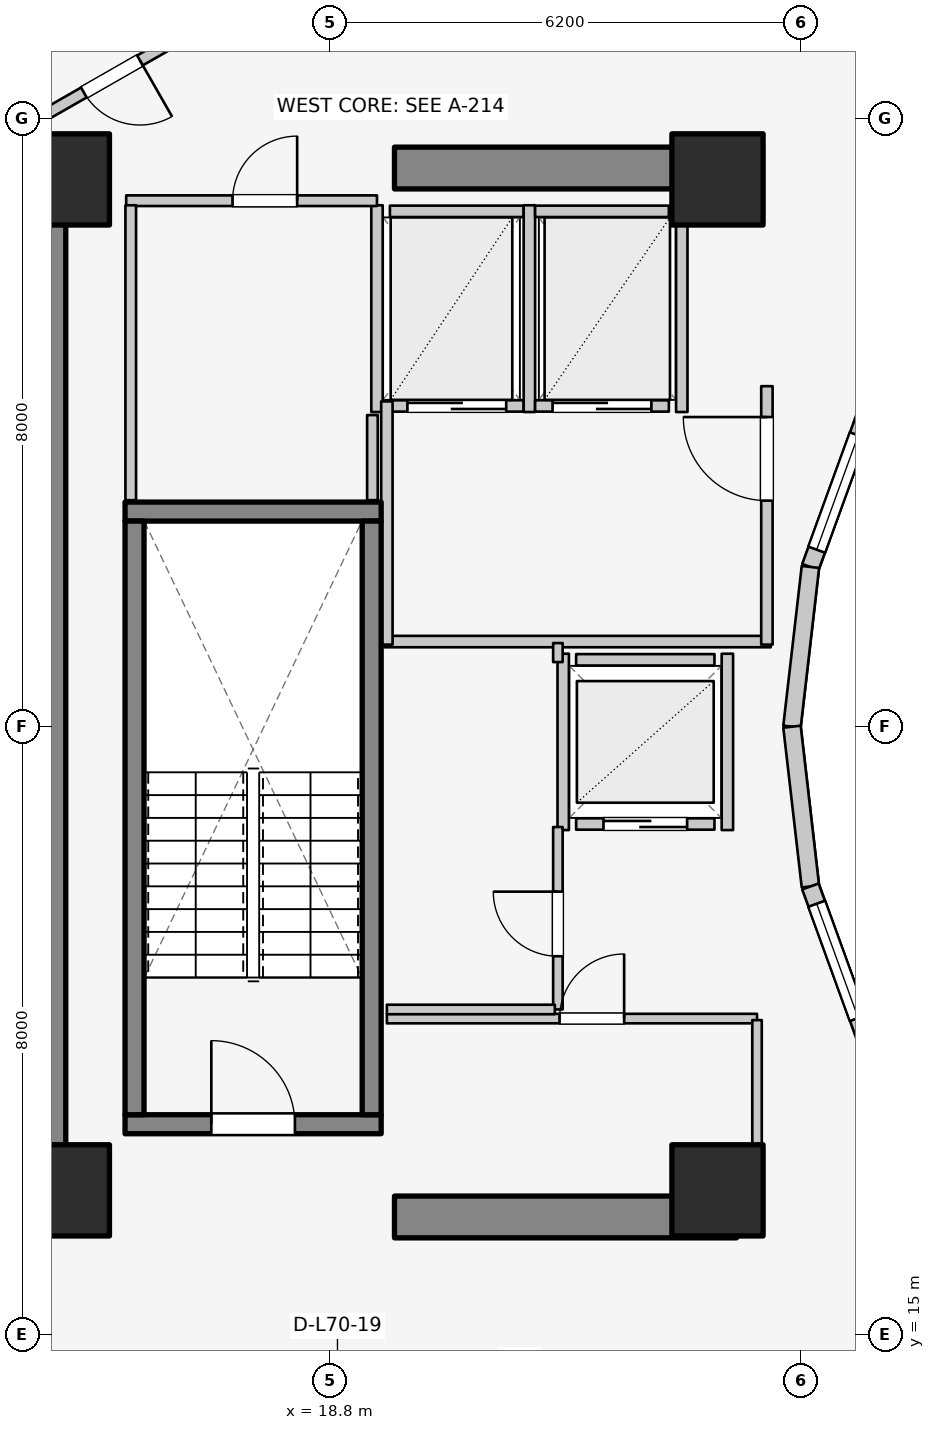
"""IFC4 building model, lengths in metres.
Left out: names, types, materials, properties, quantities, classifications, styles, units other than length and angle.
Written with IfcOpenShell. Run it as: python <this file> out.ifc"""

import sys

from ifc_helpers import new_model, si_unit, direction, frame, frame_2d, origin, origin_2d, place, context, subcontext, project, spatial, rectangle, extrude, element, fill, save


model = new_model("IFC4")
c1 = context("Model", 3, precision=1e-05, world=origin(), true_north=direction((0.0, 1.0)))
c2 = subcontext(c1, "Body", "Model", "MODEL_VIEW")
j1 = project(units=[si_unit("LENGTHUNIT", "METRE"), si_unit("PLANEANGLEUNIT", "RADIAN")], contexts=[c1])
p1 = place(None, origin())
s1 = spatial("IfcSite", under=j1, at=p1, CompositionType="ELEMENT")
p2 = place(p1, origin())
s2 = spatial("IfcBuilding", under=s1, at=p2, CompositionType="ELEMENT")
p3 = place(p2, frame((0.0, 0.0, 229.5)))
s3 = spatial("IfcBuildingStorey", under=s2, at=p3, CompositionType="ELEMENT", Elevation=229.5)
p4 = place(p3, frame((15.05, 17.05, 0.0), z_axis=(0.0, 0.0, 1.0), x_axis=(0.0, 1.0, 0.0)))
e1 = element("IfcWall", 1, at=p4, inside=s3, PredefinedType="SHEAR", context=c2, shape_type="SweptSolid", body=[
    extrude(rectangle(XDim=12.8, YDim=0.55, at=frame_2d((6.4, 0.0))), origin(), (0.0, 0.0, 1.0), 3.1),
])
for number, where, z_axis, x_axis in (
    (2, (19.65, 16.55, 0.0), (0.0, 0.0, 1.0), (1.0, 0.0, 0.0)),
    (3, (19.65, 30.35, 0.0), (0.0, 0.0, 1.0), (1.0, 0.0, 0.0)),
):
    element("IfcWall", number, at=place(p3, frame(where, z_axis=z_axis, x_axis=x_axis)), inside=s3, PredefinedType="SHEAR", context=c2, shape_type="SweptSolid", body=[
        extrude(rectangle(XDim=4.5, YDim=0.55, at=frame_2d((2.25, 0.0))), origin(), (0.0, 0.0, 1.0), 3.1),
    ])
p5 = place(p3, frame((16.105, 17.77, 0.0), z_axis=(0.0, 0.0, 1.0), x_axis=(1.0, 0.0, 0.0)))
e4 = element("IfcWall", 4, at=p5, inside=s3, PredefinedType="SOLIDWALL", context=c2, shape_type="SweptSolid", body=[
    extrude(rectangle(XDim=3.37, YDim=0.25, at=frame_2d((1.685, 0.0))), origin(), (0.0, 0.0, 1.0), 3.1),
])
p6 = place(p5, frame((1.135, 0.0, 0.0)))
e5 = element("IfcOpeningElement", 5, at=p6, cuts=e4, PredefinedType="OPENING", context=c2, shape_type="SweptSolid", body=[
    extrude(rectangle(XDim=1.1, YDim=2.1, at=frame_2d((0.55, 1.05))), frame((0.0, 0.135, 0.0), z_axis=(0.0, -1.0, 0.0), x_axis=(1.0, 0.0, 0.0)), (0.0, 0.0, 1.0), 0.27),
])
p7 = place(p3, frame((16.105, 25.83, 0.0), z_axis=(0.0, 0.0, 1.0), x_axis=(1.0, 0.0, 0.0)))
e6 = element("IfcWall", 6, at=p7, inside=s3, PredefinedType="SOLIDWALL", context=c2, shape_type="SweptSolid", body=[
    extrude(rectangle(XDim=3.37, YDim=0.25, at=frame_2d((1.685, 0.0))), origin(), (0.0, 0.0, 1.0), 3.1),
])
for number, where, z_axis, x_axis in (
    (7, (16.23, 17.895, 0.0), (0.0, 0.0, 1.0), (0.0, 1.0, 0.0)),
    (8, (19.35, 17.895, 0.0), (0.0, 0.0, 1.0), (0.0, 1.0, 0.0)),
):
    element("IfcWall", number, at=place(p3, frame(where, z_axis=z_axis, x_axis=x_axis)), inside=s3, PredefinedType="SOLIDWALL", context=c2, shape_type="SweptSolid", body=[
        extrude(rectangle(XDim=7.81, YDim=0.25, at=frame_2d((3.905, 0.0))), origin(), (0.0, 0.0, 1.0), 3.1),
    ])
for number, where, z_axis, x_axis in (
    (9, (15.3, 16.9, 0.0), (0.0, 0.0, 1.0), (1.0, 0.0, 0.0)),
    (10, (23.9, 16.9, 0.0), (0.0, 0.0, 1.0), (1.0, 0.0, 0.0)),
    (11, (23.9, 30.2, 0.0), (0.0, 0.0, 1.0), (1.0, 0.0, 0.0)),
    (12, (15.3, 30.2, 0.0), (0.0, 0.0, 1.0), (1.0, 0.0, 0.0)),
):
    element("IfcColumn", number, at=place(p3, frame(where, z_axis=z_axis, x_axis=x_axis)), inside=s3, PredefinedType="COLUMN", context=c2, shape_type="SweptSolid", body=[
        extrude(rectangle(XDim=1.2, YDim=1.2, at=origin_2d()), origin(), (0.0, 0.0, 1.0), 3.1),
    ])
p8 = place(p3, frame((25.834, 27.06, 0.0), z_axis=(0.0, 0.0, 1.0), x_axis=(-0.341423187295, -0.93990968033, 0.0)))
e13 = element("IfcWall", 13, at=p8, inside=s3, PredefinedType="STANDARD", context=c2, shape_type="SweptSolid", body=[
    extrude(rectangle(XDim=2.084, YDim=0.23, at=frame_2d((1.042, 0.0))), origin(), (0.0, 0.0, 1.0), 2.84),
])
p9 = place(p8, frame((0.242, 0.0, 0.85)))
e14 = element("IfcOpeningElement", 14, at=p9, cuts=e13, PredefinedType="OPENING", context=c2, shape_type="SweptSolid", body=[
    extrude(rectangle(XDim=1.6, YDim=1.65, at=frame_2d((0.8, 0.825))), frame((0.0, 0.125, 0.0), z_axis=(0.0, -1.0, 0.0), x_axis=(1.0, 0.0, 0.0)), (0.0, 0.0, 1.0), 0.25),
])
for number, where, z_axis, x_axis in (
    (15, (25.123, 25.102, 0.0), (0.0, 0.0, 1.0), (-0.115, -0.993, 0.0)),
    (16, (24.88, 23.0, 0.0), (0.0, 0.0, 1.0), (0.115, -0.993, 0.0)),
):
    element("IfcWall", number, at=place(p3, frame(where, z_axis=z_axis, x_axis=x_axis)), inside=s3, PredefinedType="STANDARD", context=c2, shape_type="SweptSolid", body=[
        extrude(rectangle(XDim=2.115, YDim=0.23, at=frame_2d((1.058, 0.0))), origin(), (0.0, 0.0, 1.0), 2.84),
    ])
p10 = place(p3, frame((25.123, 20.898, 0.0), z_axis=(0.0, 0.0, 1.0), x_axis=(0.341423187295, -0.93990968033, 0.0)))
e17 = element("IfcWall", 17, at=p10, inside=s3, PredefinedType="STANDARD", context=c2, shape_type="SweptSolid", body=[
    extrude(rectangle(XDim=2.084, YDim=0.23, at=frame_2d((1.042, 0.0))), origin(), (0.0, 0.0, 1.0), 2.84),
])
p11 = place(p10, frame((0.242, 0.0, 0.85)))
e18 = element("IfcOpeningElement", 18, at=p11, cuts=e17, PredefinedType="OPENING", context=c2, shape_type="SweptSolid", body=[
    extrude(rectangle(XDim=1.6, YDim=1.65, at=frame_2d((0.8, 0.825))), frame((0.0, 0.125, 0.0), z_axis=(0.0, -1.0, 0.0), x_axis=(1.0, 0.0, 0.0)), (0.0, 0.0, 1.0), 0.25),
])
p12 = place(p3, frame((16.442, 34.872, 0.0), z_axis=(0.0, 0.0, 1.0), x_axis=(-0.72731899451, -0.686299555752, 0.0)))
e19 = element("IfcWall", 19, at=p12, inside=s3, PredefinedType="STANDARD", context=c2, shape_type="SweptSolid", body=[
    extrude(rectangle(XDim=4.404, YDim=0.26, at=frame_2d((2.202, 0.0))), origin(), (0.0, 0.0, 1.0), 2.85),
])
p13 = place(p12, frame((0.827, 0.0, 0.75)))
e20 = element("IfcOpeningElement", 20, at=p13, cuts=e19, PredefinedType="OPENING", context=c2, shape_type="SweptSolid", body=[
    extrude(rectangle(XDim=1.2, YDim=1.5, at=frame_2d((0.6, 0.75))), frame((0.0, 0.14, 0.0), z_axis=(0.0, -1.0, 0.0), x_axis=(1.0, 0.0, 0.0)), (0.0, 0.0, 1.0), 0.28),
])
p14 = place(p3, frame((22.04, 21.72, 0.0), z_axis=(0.0, 0.0, 1.0), x_axis=(1.0, 0.0, 0.0)))
e21 = element("IfcWall", 21, at=p14, inside=s3, PredefinedType="SOLIDWALL", context=c2, shape_type="SweptSolid", body=[
    extrude(rectangle(XDim=1.82, YDim=0.15, at=frame_2d((0.91, 0.0))), origin(), (0.0, 0.0, 1.0), 2.12),
])
p15 = place(p14, frame((0.36, 0.0, 0.0)))
e22 = element("IfcOpeningElement", 22, at=p15, cuts=e21, PredefinedType="OPENING", context=c2, shape_type="SweptSolid", body=[
    extrude(rectangle(XDim=1.1, YDim=2.1, at=frame_2d((0.55, 1.05))), frame((0.0, 0.085, 0.0), z_axis=(0.0, -1.0, 0.0), x_axis=(1.0, 0.0, 0.0)), (0.0, 0.0, 1.0), 0.17),
])
p16 = place(p3, frame((22.04, 23.88, 0.0), z_axis=(0.0, 0.0, 1.0), x_axis=(1.0, 0.0, 0.0)))
e23 = element("IfcWall", 23, at=p16, inside=s3, PredefinedType="SOLIDWALL", context=c2, shape_type="SweptSolid", body=[
    extrude(rectangle(XDim=1.82, YDim=0.15, at=frame_2d((0.91, 0.0))), origin(), (0.0, 0.0, 1.0), 2.12),
])
p17 = place(p3, frame((21.87, 21.64, 0.0), z_axis=(0.0, 0.0, 1.0), x_axis=(0.0, 1.0, 0.0)))
e24 = element("IfcWall", 24, at=p17, inside=s3, PredefinedType="SOLIDWALL", context=c2, shape_type="SweptSolid", body=[
    extrude(rectangle(XDim=2.32, YDim=0.15, at=frame_2d((1.16, 0.0))), origin(), (0.0, 0.0, 1.0), 2.855),
])
p18 = place(p3, frame((24.03, 21.64, 0.0), z_axis=(0.0, 0.0, 1.0), x_axis=(0.0, 1.0, 0.0)))
e25 = element("IfcWall", 25, at=p18, inside=s3, PredefinedType="SOLIDWALL", context=c2, shape_type="SweptSolid", body=[
    extrude(rectangle(XDim=2.32, YDim=0.15, at=frame_2d((1.16, 0.0))), origin(), (0.0, 0.0, 1.0), 2.12),
])
p19 = place(p3, frame((19.59, 27.22, 0.0), z_axis=(0.0, 0.0, 1.0), x_axis=(1.0, 0.0, 0.0)))
e26 = element("IfcWall", 26, at=p19, inside=s3, PredefinedType="SOLIDWALL", context=c2, shape_type="SweptSolid", body=[
    extrude(rectangle(XDim=1.76, YDim=0.15, at=frame_2d((0.88, 0.0))), origin(), (0.0, 0.0, 1.0), 2.855),
])
p20 = place(p19, frame((0.23, 0.0, 0.0)))
e27 = element("IfcOpeningElement", 27, at=p20, cuts=e26, PredefinedType="OPENING", context=c2, shape_type="SweptSolid", body=[
    extrude(rectangle(XDim=1.3, YDim=2.1, at=frame_2d((0.65, 1.05))), frame((0.0, 0.085, 0.0), z_axis=(0.0, -1.0, 0.0), x_axis=(1.0, 0.0, 0.0)), (0.0, 0.0, 1.0), 0.17),
])
p21 = place(p3, frame((19.59, 29.78, 0.0), z_axis=(0.0, 0.0, 1.0), x_axis=(1.0, 0.0, 0.0)))
e28 = element("IfcWall", 28, at=p21, inside=s3, PredefinedType="SOLIDWALL", context=c2, shape_type="SweptSolid", body=[
    extrude(rectangle(XDim=1.76, YDim=0.15, at=frame_2d((0.88, 0.0))), origin(), (0.0, 0.0, 1.0), 2.855),
])
for number, where, z_axis, x_axis in (
    (29, (19.42, 27.14, 0.0), (0.0, 0.0, 1.0), (0.0, 1.0, 0.0)),
    (30, (21.425, 27.14, 0.0), (0.0, 0.0, 1.0), (0.0, 1.0, 0.0)),
):
    element("IfcWall", number, at=place(p3, frame(where, z_axis=z_axis, x_axis=x_axis)), inside=s3, PredefinedType="SOLIDWALL", context=c2, shape_type="SweptSolid", body=[
        extrude(rectangle(XDim=2.72, YDim=0.15, at=frame_2d((1.36, 0.0))), origin(), (0.0, 0.0, 1.0), 2.855),
    ])
p22 = place(p3, frame((21.5, 27.22, 0.0), z_axis=(0.0, 0.0, 1.0), x_axis=(1.0, 0.0, 0.0)))
e31 = element("IfcWall", 31, at=p22, inside=s3, PredefinedType="SOLIDWALL", context=c2, shape_type="SweptSolid", body=[
    extrude(rectangle(XDim=1.76, YDim=0.15, at=frame_2d((0.88, 0.0))), origin(), (0.0, 0.0, 1.0), 2.855),
])
p23 = place(p22, frame((0.23, 0.0, 0.0)))
e32 = element("IfcOpeningElement", 32, at=p23, cuts=e31, PredefinedType="OPENING", context=c2, shape_type="SweptSolid", body=[
    extrude(rectangle(XDim=1.3, YDim=2.1, at=frame_2d((0.65, 1.05))), frame((0.0, 0.085, 0.0), z_axis=(0.0, -1.0, 0.0), x_axis=(1.0, 0.0, 0.0)), (0.0, 0.0, 1.0), 0.17),
])
p24 = place(p3, frame((21.5, 29.78, 0.0), z_axis=(0.0, 0.0, 1.0), x_axis=(1.0, 0.0, 0.0)))
e33 = element("IfcWall", 33, at=p24, inside=s3, PredefinedType="SOLIDWALL", context=c2, shape_type="SweptSolid", body=[
    extrude(rectangle(XDim=1.76, YDim=0.15, at=frame_2d((0.88, 0.0))), origin(), (0.0, 0.0, 1.0), 2.855),
])
p25 = place(p3, frame((23.43, 27.14, 0.0), z_axis=(0.0, 0.0, 1.0), x_axis=(0.0, 1.0, 0.0)))
e34 = element("IfcWall", 34, at=p25, inside=s3, PredefinedType="SOLIDWALL", context=c2, shape_type="SweptSolid", body=[
    extrude(rectangle(XDim=2.72, YDim=0.15, at=frame_2d((1.36, 0.0))), origin(), (0.0, 0.0, 1.0), 2.855),
])
p26 = place(p3, frame((19.52, 24.12, 0.0), z_axis=(0.0, 0.0, 1.0), x_axis=(1.0, 0.0, 0.0)))
e35 = element("IfcWall", 35, at=p26, inside=s3, PredefinedType="PARTITIONING", context=c2, shape_type="SweptSolid", body=[
    extrude(rectangle(XDim=5.08, YDim=0.15, at=frame_2d((2.54, 0.0))), origin(), (0.0, 0.0, 1.0), 2.12),
])
p27 = place(p3, frame((19.55, 24.08, 0.0), z_axis=(0.0, 0.0, 1.0), x_axis=(0.0, 1.0, 0.0)))
e36 = element("IfcWall", 36, at=p27, inside=s3, PredefinedType="PARTITIONING", context=c2, shape_type="SweptSolid", body=[
    extrude(rectangle(XDim=3.2, YDim=0.15, at=frame_2d((1.6, 0.0))), origin(), (0.0, 0.0, 1.0), 2.855),
])
p28 = place(p3, frame((24.55, 24.08, 0.0), z_axis=(0.0, 0.0, 1.0), x_axis=(0.0, 1.0, 0.0)))
e37 = element("IfcWall", 37, at=p28, inside=s3, PredefinedType="PARTITIONING", context=c2, shape_type="SweptSolid", body=[
    extrude(rectangle(XDim=3.4, YDim=0.15, at=frame_2d((1.7, 0.0))), origin(), (0.0, 0.0, 1.0), 2.855),
])
p29 = place(p28, frame((1.894, 0.0, 0.0)))
e38 = element("IfcOpeningElement", 38, at=p29, cuts=e37, PredefinedType="OPENING", context=c2, shape_type="SweptSolid", body=[
    extrude(rectangle(XDim=1.1, YDim=2.1, at=frame_2d((0.55, 1.05))), frame((0.0, 0.085, 0.0), z_axis=(0.0, -1.0, 0.0), x_axis=(1.0, 0.0, 0.0)), (0.0, 0.0, 1.0), 0.17),
])
p30 = place(p3, frame((19.55, 19.16, 0.0), z_axis=(0.0, 0.0, 1.0), x_axis=(1.0, 0.0, 0.0)))
e39 = element("IfcWall", 39, at=p30, inside=s3, PredefinedType="PARTITIONING", context=c2, shape_type="SweptSolid", body=[
    extrude(rectangle(XDim=4.87, YDim=0.125, at=frame_2d((2.435, 0.0))), origin(), (0.0, 0.0, 1.0), 2.12),
])
p31 = place(p30, frame((2.272, 0.0, 0.0)))
e40 = element("IfcOpeningElement", 40, at=p31, cuts=e39, PredefinedType="OPENING", context=c2, shape_type="SweptSolid", body=[
    extrude(rectangle(XDim=0.85, YDim=2.05, at=frame_2d((0.425, 1.025))), frame((0.0, 0.073, 0.0), z_axis=(0.0, -1.0, 0.0), x_axis=(1.0, 0.0, 0.0)), (0.0, 0.0, 1.0), 0.145),
])
p32 = place(p3, frame((24.42, 17.1, 0.0), z_axis=(0.0, 0.0, 1.0), x_axis=(0.0, 1.0, 0.0)))
e41 = element("IfcWall", 41, at=p32, inside=s3, PredefinedType="PARTITIONING", context=c2, shape_type="SweptSolid", body=[
    extrude(rectangle(XDim=2.04, YDim=0.125, at=frame_2d((1.02, 0.0))), origin(), (0.0, 0.0, 1.0), 2.232),
])
p33 = place(p3, frame((21.8, 19.28, 0.0), z_axis=(0.0, 0.0, 1.0), x_axis=(0.0, 1.0, 0.0)))
e42 = element("IfcWall", 42, at=p33, inside=s3, PredefinedType="PARTITIONING", context=c2, shape_type="SweptSolid", body=[
    extrude(rectangle(XDim=2.4, YDim=0.125, at=frame_2d((1.2, 0.0))), origin(), (0.0, 0.0, 1.0), 2.855),
])
p34 = place(p33, frame((0.7, 0.0, 0.0)))
e43 = element("IfcOpeningElement", 43, at=p34, cuts=e42, PredefinedType="OPENING", context=c2, shape_type="SweptSolid", body=[
    extrude(rectangle(XDim=0.85, YDim=2.05, at=frame_2d((0.425, 1.025))), frame((0.0, 0.073, 0.0), z_axis=(0.0, -1.0, 0.0), x_axis=(1.0, 0.0, 0.0)), (0.0, 0.0, 1.0), 0.145),
])
p35 = place(p3, frame((21.8, 23.85, 0.0), z_axis=(0.0, 0.0, 1.0), x_axis=(0.0, 1.0, 0.0)))
e44 = element("IfcWall", 44, at=p35, inside=s3, PredefinedType="PARTITIONING", context=c2, shape_type="SweptSolid", body=[
    extrude(rectangle(XDim=0.25, YDim=0.125, at=frame_2d((0.125, 0.0))), origin(), (0.0, 0.0, 1.0), 2.855),
])
p36 = place(p3, frame((19.55, 19.28, 0.0), z_axis=(0.0, 0.0, 1.0), x_axis=(1.0, 0.0, 0.0)))
e45 = element("IfcWall", 45, at=p36, inside=s3, PredefinedType="PARTITIONING", context=c2, shape_type="SweptSolid", body=[
    extrude(rectangle(XDim=2.21, YDim=0.125, at=frame_2d((1.105, 0.0))), origin(), (0.0, 0.0, 1.0), 2.12),
])
p37 = place(p3, frame((16.12, 29.92, 0.0), z_axis=(0.0, 0.0, 1.0), x_axis=(1.0, 0.0, 0.0)))
e46 = element("IfcWall", 46, at=p37, inside=s3, PredefinedType="PLUMBINGWALL", context=c2, shape_type="SweptSolid", body=[
    extrude(rectangle(XDim=3.3, YDim=0.14, at=frame_2d((1.65, 0.0))), origin(), (0.0, 0.0, 1.0), 2.855),
])
p38 = place(p37, frame((1.399, 0.0, 0.0)))
e47 = element("IfcOpeningElement", 47, at=p38, cuts=e46, PredefinedType="OPENING", context=c2, shape_type="SweptSolid", body=[
    extrude(rectangle(XDim=0.85, YDim=2.05, at=frame_2d((0.425, 1.025))), frame((0.0, 0.08, 0.0), z_axis=(0.0, -1.0, 0.0), x_axis=(1.0, 0.0, 0.0)), (0.0, 0.0, 1.0), 0.16),
])
p39 = place(p3, frame((16.18, 25.98, 0.0), z_axis=(0.0, 0.0, 1.0), x_axis=(0.0, 1.0, 0.0)))
e48 = element("IfcWall", 48, at=p39, inside=s3, PredefinedType="PLUMBINGWALL", context=c2, shape_type="SweptSolid", body=[
    extrude(rectangle(XDim=3.88, YDim=0.14, at=frame_2d((1.94, 0.0))), origin(), (0.0, 0.0, 1.0), 2.855),
])
p40 = place(p3, frame((19.36, 25.98, 0.0), z_axis=(0.0, 0.0, 1.0), x_axis=(0.0, 1.0, 0.0)))
e49 = element("IfcWall", 49, at=p40, inside=s3, PredefinedType="PLUMBINGWALL", context=c2, shape_type="SweptSolid", body=[
    extrude(rectangle(XDim=1.12, YDim=0.14, at=frame_2d((0.56, 0.0))), origin(), (0.0, 0.0, 1.0), 2.855),
])
p41 = place(p3, frame((17.243, 32.305, 0.0), z_axis=(0.0, 0.0, 1.0), x_axis=(-0.867991349648, -0.496579315857, 0.0)))
e50 = element("IfcWall", 50, at=p41, inside=s3, PredefinedType="PARTITIONING", context=c2, shape_type="SweptSolid", body=[
    extrude(rectangle(XDim=2.567, YDim=0.15, at=frame_2d((1.283, 0.0))), origin(), (0.0, 0.0, 1.0), 2.22),
])
p42 = place(p41, frame((1.086, 0.0, 0.0)))
e51 = element("IfcOpeningElement", 51, at=p42, cuts=e50, PredefinedType="OPENING", context=c2, shape_type="SweptSolid", body=[
    extrude(rectangle(XDim=0.85, YDim=2.05, at=frame_2d((0.425, 1.025))), frame((0.0, 0.085, 0.0), z_axis=(0.0, -1.0, 0.0), x_axis=(1.0, 0.0, 0.0)), (0.0, 0.0, 1.0), 0.17),
])
p43 = place(p9, origin())
e52 = element("IfcWindow", 52, at=p43, inside=s3, PartitioningType="SINGLE_PANEL", PredefinedType="WINDOW", context=c2, shape_type="SweptSolid", body=[
    extrude(rectangle(XDim=1.6, YDim=1.65, at=frame_2d((0.8, 0.825))), frame((0.0, 0.03, 0.0), z_axis=(0.0, -1.0, 0.0), x_axis=(1.0, 0.0, 0.0)), (0.0, 0.0, 1.0), 0.06),
])
fill(e14, e52)
p44 = place(p11, origin())
e53 = element("IfcWindow", 53, at=p44, inside=s3, PartitioningType="SINGLE_PANEL", PredefinedType="WINDOW", context=c2, shape_type="SweptSolid", body=[
    extrude(rectangle(XDim=1.6, YDim=1.65, at=frame_2d((0.8, 0.825))), frame((0.0, 0.03, 0.0), z_axis=(0.0, -1.0, 0.0), x_axis=(1.0, 0.0, 0.0)), (0.0, 0.0, 1.0), 0.06),
])
fill(e18, e53)
p45 = place(p6, origin())
e54 = element("IfcDoor", 54, at=p45, inside=s3, OperationType="SINGLE_SWING_LEFT", PredefinedType="DOOR", context=c2, shape_type="SweptSolid", body=[
    extrude(rectangle(XDim=1.1, YDim=2.1, at=frame_2d((0.55, 1.05))), frame((0.0, 0.025, 0.0), z_axis=(0.0, -1.0, 0.0), x_axis=(1.0, 0.0, 0.0)), (0.0, 0.0, 1.0), 0.05),
])
fill(e5, e54)
p46 = place(p15, origin())
e55 = element("IfcDoor", 55, at=p46, inside=s3, OperationType="DOUBLE_DOOR_SLIDING", PredefinedType="DOOR", context=c2, shape_type="SweptSolid", body=[
    extrude(rectangle(XDim=1.1, YDim=2.1, at=frame_2d((0.55, 1.05))), frame((0.0, 0.025, 0.0), z_axis=(0.0, -1.0, 0.0), x_axis=(1.0, 0.0, 0.0)), (0.0, 0.0, 1.0), 0.05),
])
fill(e22, e55)
p47 = place(p20, origin())
e56 = element("IfcDoor", 56, at=p47, inside=s3, OperationType="DOUBLE_DOOR_SLIDING", PredefinedType="DOOR", context=c2, shape_type="SweptSolid", body=[
    extrude(rectangle(XDim=1.3, YDim=2.1, at=frame_2d((0.65, 1.05))), frame((0.0, 0.025, 0.0), z_axis=(0.0, -1.0, 0.0), x_axis=(1.0, 0.0, 0.0)), (0.0, 0.0, 1.0), 0.05),
])
fill(e27, e56)
p48 = place(p23, origin())
e57 = element("IfcDoor", 57, at=p48, inside=s3, OperationType="DOUBLE_DOOR_SLIDING", PredefinedType="DOOR", context=c2, shape_type="SweptSolid", body=[
    extrude(rectangle(XDim=1.3, YDim=2.1, at=frame_2d((0.65, 1.05))), frame((0.0, 0.025, 0.0), z_axis=(0.0, -1.0, 0.0), x_axis=(1.0, 0.0, 0.0)), (0.0, 0.0, 1.0), 0.05),
])
fill(e32, e57)
p49 = place(p29, origin())
e58 = element("IfcDoor", 58, at=p49, inside=s3, OperationType="SINGLE_SWING_RIGHT", PredefinedType="DOOR", context=c2, shape_type="SweptSolid", body=[
    extrude(rectangle(XDim=1.1, YDim=2.1, at=frame_2d((0.55, 1.05))), frame((0.0, 0.025, 0.0), z_axis=(0.0, -1.0, 0.0), x_axis=(1.0, 0.0, 0.0)), (0.0, 0.0, 1.0), 0.05),
])
fill(e38, e58)
p50 = place(p31, origin())
e59 = element("IfcDoor", 59, at=p50, inside=s3, OperationType="SINGLE_SWING_RIGHT", PredefinedType="DOOR", context=c2, shape_type="SweptSolid", body=[
    extrude(rectangle(XDim=0.85, YDim=2.05, at=frame_2d((0.425, 1.025))), frame((0.0, 0.025, 0.0), z_axis=(0.0, -1.0, 0.0), x_axis=(1.0, 0.0, 0.0)), (0.0, 0.0, 1.0), 0.05),
])
fill(e40, e59)
p51 = place(p34, origin())
e60 = element("IfcDoor", 60, at=p51, inside=s3, OperationType="SINGLE_SWING_RIGHT", PredefinedType="DOOR", context=c2, shape_type="SweptSolid", body=[
    extrude(rectangle(XDim=0.85, YDim=2.05, at=frame_2d((0.425, 1.025))), frame((0.0, 0.025, 0.0), z_axis=(0.0, -1.0, 0.0), x_axis=(1.0, 0.0, 0.0)), (0.0, 0.0, 1.0), 0.05),
])
fill(e43, e60)
p52 = place(p38, origin())
e61 = element("IfcDoor", 61, at=p52, inside=s3, OperationType="SINGLE_SWING_RIGHT", PredefinedType="DOOR", context=c2, shape_type="SweptSolid", body=[
    extrude(rectangle(XDim=0.85, YDim=2.05, at=frame_2d((0.425, 1.025))), frame((0.0, 0.025, 0.0), z_axis=(0.0, -1.0, 0.0), x_axis=(1.0, 0.0, 0.0)), (0.0, 0.0, 1.0), 0.05),
])
fill(e47, e61)
p53 = place(p42, origin())
e62 = element("IfcDoor", 62, at=p53, inside=s3, OperationType="SINGLE_SWING_LEFT", PredefinedType="DOOR", context=c2, shape_type="SweptSolid", body=[
    extrude(rectangle(XDim=0.85, YDim=2.05, at=frame_2d((0.425, 1.025))), frame((0.0, 0.025, 0.0), z_axis=(0.0, -1.0, 0.0), x_axis=(1.0, 0.0, 0.0)), (0.0, 0.0, 1.0), 0.05),
])
fill(e51, e62)
save(model, sys.argv[1])
